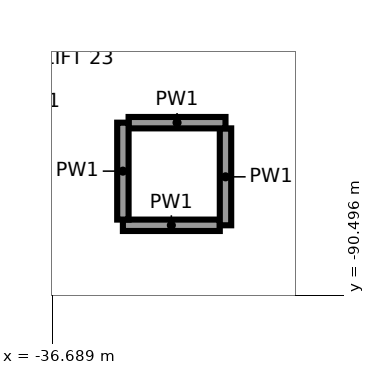
"""IFC4 building model, lengths in metres.
Left out: names, types, materials, properties, quantities, classifications, styles, units other than length and angle.
Written with IfcOpenShell. Run it as: python <this file> out.ifc"""

import sys

from ifc_helpers import new_model, si_unit, direction, frame, frame_2d, origin, origin_2d, place, context, subcontext, project, spatial, rectangle, circle, extrude, element, save


model = new_model("IFC4")
c1 = context("Model", 3, precision=1e-05, world=origin(), true_north=direction((0.0, 1.0)))
c2 = subcontext(c1, "Body", "Model", "MODEL_VIEW")
j1 = project(units=[si_unit("LENGTHUNIT", "METRE"), si_unit("PLANEANGLEUNIT", "RADIAN")], contexts=[c1])
p1 = place(None, origin())
s1 = spatial("IfcSite", under=j1, at=p1, CompositionType="ELEMENT")
p2 = place(p1, origin())
s2 = spatial("IfcBuilding", under=s1, at=p2, CompositionType="ELEMENT")
p3 = place(p2, frame((0.0, 0.0, 6.5)))
s3 = spatial("IfcBuildingStorey", under=s2, at=p3, CompositionType="ELEMENT", Elevation=6.5)
p4 = place(p3, frame((-32.944, -90.551, 0.0), z_axis=(0.0, 0.0, 1.0), x_axis=(1.0, 0.0, 0.0)))
e1 = element("IfcColumn", 1, at=p4, inside=s3, PredefinedType="COLUMN", context=c2, shape_type="SweptSolid", body=[
    extrude(circle(Radius=0.55, at=origin_2d()), origin(), (0.0, 0.0, 1.0), 5.5),
])
p5 = place(p3, frame((-35.758, -89.576, 0.0), z_axis=(0.0, 0.0, 1.0), x_axis=(1.0, 0.0, 0.0)))
e2 = element("IfcWall", 2, at=p5, inside=s3, PredefinedType="PARTITIONING", context=c2, shape_type="SweptSolid", body=[
    extrude(rectangle(XDim=1.275, YDim=0.15, at=frame_2d((0.637, 0.0))), origin(), (0.0, 0.0, 1.0), 5.15),
])
for number, where, z_axis, x_axis in (
    (3, (-34.408, -89.576, 0.0), (0.0, 0.0, 1.0), (0.0, 1.0, 0.0)),
    (4, (-34.408, -88.226, 0.0), (0.0, 0.0, 1.0), (-1.0, 0.0, 0.0)),
    (5, (-35.758, -88.226, 0.0), (0.0, 0.0, 1.0), (0.0, -1.0, 0.0)),
):
    element("IfcWall", number, at=place(p3, frame(where, z_axis=z_axis, x_axis=x_axis)), inside=s3, PredefinedType="PARTITIONING", context=c2, shape_type="SweptSolid", body=[
        extrude(rectangle(XDim=1.275, YDim=0.15, at=frame_2d((0.638, 0.0))), origin(), (0.0, 0.0, 1.0), 5.15),
    ])
save(model, sys.argv[1])
